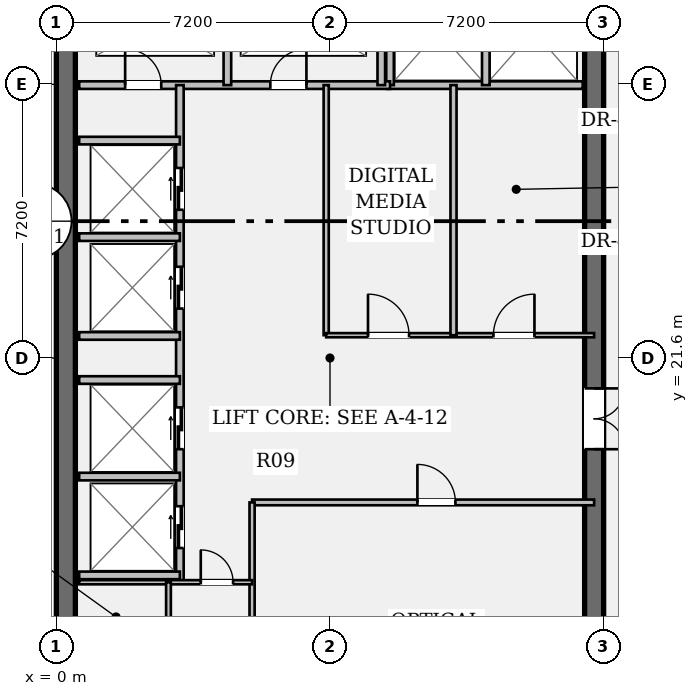
"""IFC4 building model, lengths in metres.
Left out: names, types, materials, properties, quantities, classifications, styles, units other than length and angle.
Written with IfcOpenShell. Run it as: python <this file> out.ifc"""

import sys

from ifc_helpers import new_model, si_unit, direction, frame, frame_2d, origin, place, context, subcontext, project, spatial, rectangle, extrude, element, fill, save


model = new_model("IFC4")
c1 = context("Model", 3, precision=1e-05, world=origin(), true_north=direction((0.0, 1.0)))
c2 = subcontext(c1, "Body", "Model", "MODEL_VIEW")
j1 = project(units=[si_unit("LENGTHUNIT", "METRE"), si_unit("PLANEANGLEUNIT", "RADIAN")], contexts=[c1])
p1 = place(None, origin())
s1 = spatial("IfcSite", under=j1, at=p1, CompositionType="ELEMENT")
p2 = place(p1, origin())
s2 = spatial("IfcBuilding", under=s1, at=p2, CompositionType="ELEMENT")
p3 = place(p2, frame((0.0, 0.0, 194.25)))
s3 = spatial("IfcBuildingStorey", under=s2, at=p3, CompositionType="ELEMENT", Elevation=194.25)
p4 = place(p3, frame((0.25, 7.2, 0.0), z_axis=(0.0, 0.0, 1.0), x_axis=(0.0, 1.0, 0.0)))
e1 = element("IfcWall", 1, at=p4, inside=s3, PredefinedType="SHEAR", context=c2, shape_type="SweptSolid", body=[
    extrude(rectangle(XDim=28.8, YDim=0.5, at=frame_2d((14.4, 0.0))), origin(), (0.0, 0.0, 1.0), 3.24),
])
p5 = place(p3, frame((14.15, 35.5, 0.0), z_axis=(0.0, 0.0, 1.0), x_axis=(0.0, -1.0, 0.0)))
e2 = element("IfcWall", 2, at=p5, inside=s3, PredefinedType="SHEAR", context=c2, shape_type="SweptSolid", body=[
    extrude(rectangle(XDim=27.8, YDim=0.5, at=frame_2d((13.9, 0.0))), origin(), (0.0, 0.0, 1.0), 3.24),
])
p6 = place(p5, frame((1.4, 0.0, 0.0)))
e3 = element("IfcOpeningElement", 3, at=p6, cuts=e2, PredefinedType="OPENING", context=c2, shape_type="SweptSolid", body=[
    extrude(rectangle(XDim=1.2, YDim=2.15, at=frame_2d((0.6, 1.075))), frame((0.0, 0.262, 0.0), z_axis=(0.0, -1.0, 0.0), x_axis=(1.0, 0.0, 0.0)), (0.0, 0.0, 1.0), 0.524),
])
p7 = place(p5, frame((25.35, 0.0, 0.0)))
e4 = element("IfcOpeningElement", 4, at=p7, cuts=e2, PredefinedType="OPENING", context=c2, shape_type="SweptSolid", body=[
    extrude(rectangle(XDim=1.2, YDim=2.15, at=frame_2d((0.6, 1.075))), frame((0.0, 0.262, 0.0), z_axis=(0.0, -1.0, 0.0), x_axis=(1.0, 0.0, 0.0)), (0.0, 0.0, 1.0), 0.524),
])
p8 = place(p5, frame((14.7, 0.0, 0.0)))
e5 = element("IfcOpeningElement", 5, at=p8, cuts=e2, PredefinedType="OPENING", context=c2, shape_type="SweptSolid", body=[
    extrude(rectangle(XDim=1.6, YDim=2.2, at=frame_2d((0.8, 1.1))), frame((0.0, 0.262, 0.0), z_axis=(0.0, -1.0, 0.0), x_axis=(1.0, 0.0, 0.0)), (0.0, 0.0, 1.0), 0.524),
])
p9 = place(p3, frame((8.7, 28.78, 0.0), z_axis=(0.0, 0.0, 1.0), x_axis=(1.0, 0.0, 0.0)))
e6 = element("IfcWall", 6, at=p9, inside=s3, PredefinedType="PARTITIONING", context=c2, shape_type="SweptSolid", body=[
    extrude(rectangle(XDim=5.15, YDim=0.2, at=frame_2d((2.575, 0.0))), origin(), (0.0, 0.0, 1.0), 3.24),
])
for number, where, z_axis, x_axis in (
    (7, (8.78, 28.78, 0.0), (0.0, 0.0, 1.0), (0.0, 1.0, 0.0)),
    (8, (11.3, 28.78, 0.0), (0.0, 0.0, 1.0), (0.0, 1.0, 0.0)),
):
    element("IfcWall", number, at=place(p3, frame(where, z_axis=z_axis, x_axis=x_axis)), inside=s3, PredefinedType="PARTITIONING", context=c2, shape_type="SweptSolid", body=[
        extrude(rectangle(XDim=3.1, YDim=0.2, at=frame_2d((1.55, 0.0))), origin(), (0.0, 0.0, 1.0), 3.24),
    ])
p10 = place(p3, frame((0.6, 28.78, 0.0), z_axis=(0.0, 0.0, 1.0), x_axis=(1.0, 0.0, 0.0)))
e9 = element("IfcWall", 9, at=p10, inside=s3, PredefinedType="PARTITIONING", context=c2, shape_type="SweptSolid", body=[
    extrude(rectangle(XDim=8.18, YDim=0.2, at=frame_2d((4.09, 0.0))), origin(), (0.0, 0.0, 1.0), 3.24),
])
p11 = place(p10, frame((1.21, 0.0, 0.0)))
e10 = element("IfcOpeningElement", 10, at=p11, cuts=e9, PredefinedType="OPENING", context=c2, shape_type="SweptSolid", body=[
    extrude(rectangle(XDim=0.95, YDim=2.15, at=frame_2d((0.475, 1.075))), frame((0.0, 0.112, 0.0), z_axis=(0.0, -1.0, 0.0), x_axis=(1.0, 0.0, 0.0)), (0.0, 0.0, 1.0), 0.224),
])
p12 = place(p10, frame((5.03, 0.0, 0.0)))
e11 = element("IfcOpeningElement", 11, at=p12, cuts=e9, PredefinedType="OPENING", context=c2, shape_type="SweptSolid", body=[
    extrude(rectangle(XDim=0.95, YDim=2.15, at=frame_2d((0.475, 1.075))), frame((0.0, 0.112, 0.0), z_axis=(0.0, -1.0, 0.0), x_axis=(1.0, 0.0, 0.0)), (0.0, 0.0, 1.0), 0.224),
])
for number, where, z_axis, x_axis in (
    (12, (4.5, 28.78, 0.0), (0.0, 0.0, 1.0), (0.0, 1.0, 0.0)),
    (13, (8.55, 28.78, 0.0), (0.0, 0.0, 1.0), (0.0, 1.0, 0.0)),
):
    element("IfcWall", number, at=place(p3, frame(where, z_axis=z_axis, x_axis=x_axis)), inside=s3, PredefinedType="PARTITIONING", context=c2, shape_type="SweptSolid", body=[
        extrude(rectangle(XDim=2.94, YDim=0.2, at=frame_2d((1.47, 0.0))), origin(), (0.0, 0.0, 1.0), 3.24),
    ])
p13 = place(p3, frame((3.25, 15.7, 0.0), z_axis=(0.0, 0.0, 1.0), x_axis=(0.0, 1.0, 0.0)))
e14 = element("IfcWall", 14, at=p13, inside=s3, PredefinedType="PARTITIONING", context=c2, shape_type="SweptSolid", body=[
    extrude(rectangle(XDim=13.08, YDim=0.2, at=frame_2d((6.54, 0.0))), origin(), (0.0, 0.0, 1.0), 3.24),
])
p14 = place(p13, frame((0.9, 0.0, 0.0)))
e15 = element("IfcOpeningElement", 15, at=p14, cuts=e14, PredefinedType="OPENING", context=c2, shape_type="SweptSolid", body=[
    extrude(rectangle(XDim=1.1, YDim=2.2, at=frame_2d((0.55, 1.1))), frame((0.0, 0.112, 0.0), z_axis=(0.0, -1.0, 0.0), x_axis=(1.0, 0.0, 0.0)), (0.0, 0.0, 1.0), 0.224),
])
p15 = place(p13, frame((3.5, 0.0, 0.0)))
e16 = element("IfcOpeningElement", 16, at=p15, cuts=e14, PredefinedType="OPENING", context=c2, shape_type="SweptSolid", body=[
    extrude(rectangle(XDim=1.1, YDim=2.2, at=frame_2d((0.55, 1.1))), frame((0.0, 0.112, 0.0), z_axis=(0.0, -1.0, 0.0), x_axis=(1.0, 0.0, 0.0)), (0.0, 0.0, 1.0), 0.224),
])
p16 = place(p13, frame((7.2, 0.0, 0.0)))
e17 = element("IfcOpeningElement", 17, at=p16, cuts=e14, PredefinedType="OPENING", context=c2, shape_type="SweptSolid", body=[
    extrude(rectangle(XDim=1.1, YDim=2.2, at=frame_2d((0.55, 1.1))), frame((0.0, 0.112, 0.0), z_axis=(0.0, -1.0, 0.0), x_axis=(1.0, 0.0, 0.0)), (0.0, 0.0, 1.0), 0.224),
])
p17 = place(p13, frame((9.8, 0.0, 0.0)))
e18 = element("IfcOpeningElement", 18, at=p17, cuts=e14, PredefinedType="OPENING", context=c2, shape_type="SweptSolid", body=[
    extrude(rectangle(XDim=1.1, YDim=2.2, at=frame_2d((0.55, 1.1))), frame((0.0, 0.112, 0.0), z_axis=(0.0, -1.0, 0.0), x_axis=(1.0, 0.0, 0.0)), (0.0, 0.0, 1.0), 0.224),
])
for number, where, z_axis, x_axis in (
    (19, (0.6, 15.88, 0.0), (0.0, 0.0, 1.0), (1.0, 0.0, 0.0)),
    (20, (0.6, 18.48, 0.0), (0.0, 0.0, 1.0), (1.0, 0.0, 0.0)),
    (21, (0.6, 22.18, 0.0), (0.0, 0.0, 1.0), (1.0, 0.0, 0.0)),
    (22, (0.6, 24.78, 0.0), (0.0, 0.0, 1.0), (1.0, 0.0, 0.0)),
    (23, (0.6, 21.02, 0.0), (0.0, 0.0, 1.0), (1.0, 0.0, 0.0)),
    (24, (0.6, 27.32, 0.0), (0.0, 0.0, 1.0), (1.0, 0.0, 0.0)),
):
    element("IfcWall", number, at=place(p3, frame(where, z_axis=z_axis, x_axis=x_axis)), inside=s3, PredefinedType="PARTITIONING", context=c2, shape_type="SweptSolid", body=[
        extrude(rectangle(XDim=2.65, YDim=0.2, at=frame_2d((1.325, 0.0))), origin(), (0.0, 0.0, 1.0), 3.24),
    ])
p18 = place(p3, frame((7.1, 22.2, 0.0), z_axis=(0.0, 0.0, 1.0), x_axis=(0.0, 1.0, 0.0)))
e25 = element("IfcWall", 25, at=p18, inside=s3, PredefinedType="PARTITIONING", context=c2, shape_type="SweptSolid", body=[
    extrude(rectangle(XDim=6.58, YDim=0.135, at=frame_2d((3.29, 0.0))), origin(), (0.0, 0.0, 1.0), 3.24),
])
p19 = place(p3, frame((7.1, 22.2, 0.0), z_axis=(0.0, 0.0, 1.0), x_axis=(1.0, 0.0, 0.0)))
e26 = element("IfcWall", 26, at=p19, inside=s3, PredefinedType="PARTITIONING", context=c2, shape_type="SweptSolid", body=[
    extrude(rectangle(XDim=7.05, YDim=0.11, at=frame_2d((3.525, 0.0))), origin(), (0.0, 0.0, 1.0), 3.24),
])
p20 = place(p19, frame((1.1, 0.0, 0.0)))
e27 = element("IfcOpeningElement", 27, at=p20, cuts=e26, PredefinedType="OPENING", context=c2, shape_type="SweptSolid", body=[
    extrude(rectangle(XDim=1.08, YDim=2.15, at=frame_2d((0.54, 1.075))), frame((0.0, 0.067, 0.0), z_axis=(0.0, -1.0, 0.0), x_axis=(1.0, 0.0, 0.0)), (0.0, 0.0, 1.0), 0.134),
])
p21 = place(p19, frame((4.4, 0.0, 0.0)))
e28 = element("IfcOpeningElement", 28, at=p21, cuts=e26, PredefinedType="OPENING", context=c2, shape_type="SweptSolid", body=[
    extrude(rectangle(XDim=1.08, YDim=2.15, at=frame_2d((0.54, 1.075))), frame((0.0, 0.067, 0.0), z_axis=(0.0, -1.0, 0.0), x_axis=(1.0, 0.0, 0.0)), (0.0, 0.0, 1.0), 0.134),
])
p22 = place(p3, frame((10.45, 22.2, 0.0), z_axis=(0.0, 0.0, 1.0), x_axis=(0.0, 1.0, 0.0)))
e29 = element("IfcWall", 29, at=p22, inside=s3, PredefinedType="PARTITIONING", context=c2, shape_type="SweptSolid", body=[
    extrude(rectangle(XDim=6.58, YDim=0.16, at=frame_2d((3.29, 0.0))), origin(), (0.0, 0.0, 1.0), 3.24),
])
p23 = place(p3, frame((5.15, 17.8, 0.0), z_axis=(0.0, 0.0, 1.0), x_axis=(1.0, 0.0, 0.0)))
e30 = element("IfcWall", 30, at=p23, inside=s3, PredefinedType="PARTITIONING", context=c2, shape_type="SweptSolid", body=[
    extrude(rectangle(XDim=9.0, YDim=0.15, at=frame_2d((4.5, 0.0))), origin(), (0.0, 0.0, 1.0), 3.24),
])
p24 = place(p23, frame((4.35, 0.0, 0.0)))
e31 = element("IfcOpeningElement", 31, at=p24, cuts=e30, PredefinedType="OPENING", context=c2, shape_type="SweptSolid", body=[
    extrude(rectangle(XDim=1.0, YDim=2.15, at=frame_2d((0.5, 1.075))), frame((0.0, 0.087, 0.0), z_axis=(0.0, -1.0, 0.0), x_axis=(1.0, 0.0, 0.0)), (0.0, 0.0, 1.0), 0.174),
])
p25 = place(p3, frame((5.15, 11.2, 0.0), z_axis=(0.0, 0.0, 1.0), x_axis=(0.0, 1.0, 0.0)))
e32 = element("IfcWall", 32, at=p25, inside=s3, PredefinedType="PARTITIONING", context=c2, shape_type="SweptSolid", body=[
    extrude(rectangle(XDim=6.6, YDim=0.135, at=frame_2d((3.3, 0.0))), origin(), (0.0, 0.0, 1.0), 3.24),
])
p26 = place(p3, frame((0.6, 15.7, 0.0), z_axis=(0.0, 0.0, 1.0), x_axis=(1.0, 0.0, 0.0)))
e33 = element("IfcWall", 33, at=p26, inside=s3, PredefinedType="PARTITIONING", context=c2, shape_type="SweptSolid", body=[
    extrude(rectangle(XDim=4.55, YDim=0.11, at=frame_2d((2.275, 0.0))), origin(), (0.0, 0.0, 1.0), 3.24),
])
p27 = place(p26, frame((3.2, 0.0, 0.0)))
e34 = element("IfcOpeningElement", 34, at=p27, cuts=e33, PredefinedType="OPENING", context=c2, shape_type="SweptSolid", body=[
    extrude(rectangle(XDim=0.85, YDim=2.15, at=frame_2d((0.425, 1.075))), frame((0.0, 0.067, 0.0), z_axis=(0.0, -1.0, 0.0), x_axis=(1.0, 0.0, 0.0)), (0.0, 0.0, 1.0), 0.134),
])
p28 = place(p3, frame((2.95, 11.28, 0.0), z_axis=(0.0, 0.0, 1.0), x_axis=(0.0, 1.0, 0.0)))
e35 = element("IfcWall", 35, at=p28, inside=s3, PredefinedType="PARTITIONING", context=c2, shape_type="SweptSolid", body=[
    extrude(rectangle(XDim=4.42, YDim=0.125, at=frame_2d((2.21, 0.0))), origin(), (0.0, 0.0, 1.0), 3.24),
])
p29 = place(p28, frame((1.6, 0.0, 0.0)))
e36 = element("IfcOpeningElement", 36, at=p29, cuts=e35, PredefinedType="OPENING", context=c2, shape_type="SweptSolid", body=[
    extrude(rectangle(XDim=0.85, YDim=2.15, at=frame_2d((0.425, 1.075))), frame((0.0, 0.074, 0.0), z_axis=(0.0, -1.0, 0.0), x_axis=(1.0, 0.0, 0.0)), (0.0, 0.0, 1.0), 0.149),
])
p30 = place(p11, origin())
e37 = element("IfcDoor", 37, at=p30, inside=s3, OperationType="SINGLE_SWING_LEFT", PredefinedType="DOOR", context=c2, shape_type="SweptSolid", body=[
    extrude(rectangle(XDim=0.95, YDim=2.15, at=frame_2d((0.475, 1.075))), frame((0.0, 0.025, 0.0), z_axis=(0.0, -1.0, 0.0), x_axis=(1.0, 0.0, 0.0)), (0.0, 0.0, 1.0), 0.05),
])
fill(e10, e37)
p31 = place(p12, origin())
e38 = element("IfcDoor", 38, at=p31, inside=s3, OperationType="SINGLE_SWING_RIGHT", PredefinedType="DOOR", context=c2, shape_type="SweptSolid", body=[
    extrude(rectangle(XDim=0.95, YDim=2.15, at=frame_2d((0.475, 1.075))), frame((0.0, 0.025, 0.0), z_axis=(0.0, -1.0, 0.0), x_axis=(1.0, 0.0, 0.0)), (0.0, 0.0, 1.0), 0.05),
])
fill(e11, e38)
p32 = place(p8, origin())
e39 = element("IfcDoor", 39, at=p32, inside=s3, OperationType="DOUBLE_DOOR_SINGLE_SWING", PredefinedType="DOOR", context=c2, shape_type="SweptSolid", body=[
    extrude(rectangle(XDim=1.6, YDim=2.2, at=frame_2d((0.8, 1.1))), frame((0.0, 0.025, 0.0), z_axis=(0.0, -1.0, 0.0), x_axis=(1.0, 0.0, 0.0)), (0.0, 0.0, 1.0), 0.05),
])
fill(e5, e39)
p33 = place(p14, origin())
e40 = element("IfcDoor", 40, at=p33, inside=s3, OperationType="DOUBLE_DOOR_SLIDING", PredefinedType="DOOR", context=c2, shape_type="SweptSolid", body=[
    extrude(rectangle(XDim=1.1, YDim=2.2, at=frame_2d((0.55, 1.1))), frame((0.0, 0.025, 0.0), z_axis=(0.0, -1.0, 0.0), x_axis=(1.0, 0.0, 0.0)), (0.0, 0.0, 1.0), 0.05),
])
fill(e15, e40)
p34 = place(p15, origin())
e41 = element("IfcDoor", 41, at=p34, inside=s3, OperationType="DOUBLE_DOOR_SLIDING", PredefinedType="DOOR", context=c2, shape_type="SweptSolid", body=[
    extrude(rectangle(XDim=1.1, YDim=2.2, at=frame_2d((0.55, 1.1))), frame((0.0, 0.025, 0.0), z_axis=(0.0, -1.0, 0.0), x_axis=(1.0, 0.0, 0.0)), (0.0, 0.0, 1.0), 0.05),
])
fill(e16, e41)
p35 = place(p16, origin())
e42 = element("IfcDoor", 42, at=p35, inside=s3, OperationType="DOUBLE_DOOR_SLIDING", PredefinedType="DOOR", context=c2, shape_type="SweptSolid", body=[
    extrude(rectangle(XDim=1.1, YDim=2.2, at=frame_2d((0.55, 1.1))), frame((0.0, 0.025, 0.0), z_axis=(0.0, -1.0, 0.0), x_axis=(1.0, 0.0, 0.0)), (0.0, 0.0, 1.0), 0.05),
])
fill(e17, e42)
p36 = place(p17, origin())
e43 = element("IfcDoor", 43, at=p36, inside=s3, OperationType="DOUBLE_DOOR_SLIDING", PredefinedType="DOOR", context=c2, shape_type="SweptSolid", body=[
    extrude(rectangle(XDim=1.1, YDim=2.2, at=frame_2d((0.55, 1.1))), frame((0.0, 0.025, 0.0), z_axis=(0.0, -1.0, 0.0), x_axis=(1.0, 0.0, 0.0)), (0.0, 0.0, 1.0), 0.05),
])
fill(e18, e43)
p37 = place(p20, origin())
e44 = element("IfcDoor", 44, at=p37, inside=s3, OperationType="SINGLE_SWING_LEFT", PredefinedType="DOOR", context=c2, shape_type="SweptSolid", body=[
    extrude(rectangle(XDim=1.08, YDim=2.15, at=frame_2d((0.54, 1.075))), frame((0.0, 0.025, 0.0), z_axis=(0.0, -1.0, 0.0), x_axis=(1.0, 0.0, 0.0)), (0.0, 0.0, 1.0), 0.05),
])
fill(e27, e44)
p38 = place(p21, origin())
e45 = element("IfcDoor", 45, at=p38, inside=s3, OperationType="SINGLE_SWING_RIGHT", PredefinedType="DOOR", context=c2, shape_type="SweptSolid", body=[
    extrude(rectangle(XDim=1.08, YDim=2.15, at=frame_2d((0.54, 1.075))), frame((0.0, 0.025, 0.0), z_axis=(0.0, -1.0, 0.0), x_axis=(1.0, 0.0, 0.0)), (0.0, 0.0, 1.0), 0.05),
])
fill(e28, e45)
p39 = place(p24, origin())
e46 = element("IfcDoor", 46, at=p39, inside=s3, OperationType="SINGLE_SWING_LEFT", PredefinedType="DOOR", context=c2, shape_type="SweptSolid", body=[
    extrude(rectangle(XDim=1.0, YDim=2.15, at=frame_2d((0.5, 1.075))), frame((0.0, 0.025, 0.0), z_axis=(0.0, -1.0, 0.0), x_axis=(1.0, 0.0, 0.0)), (0.0, 0.0, 1.0), 0.05),
])
fill(e31, e46)
p40 = place(p27, origin())
e47 = element("IfcDoor", 47, at=p40, inside=s3, OperationType="SINGLE_SWING_LEFT", PredefinedType="DOOR", context=c2, shape_type="SweptSolid", body=[
    extrude(rectangle(XDim=0.85, YDim=2.15, at=frame_2d((0.425, 1.075))), frame((0.0, 0.025, 0.0), z_axis=(0.0, -1.0, 0.0), x_axis=(1.0, 0.0, 0.0)), (0.0, 0.0, 1.0), 0.05),
])
fill(e34, e47)
save(model, sys.argv[1])
